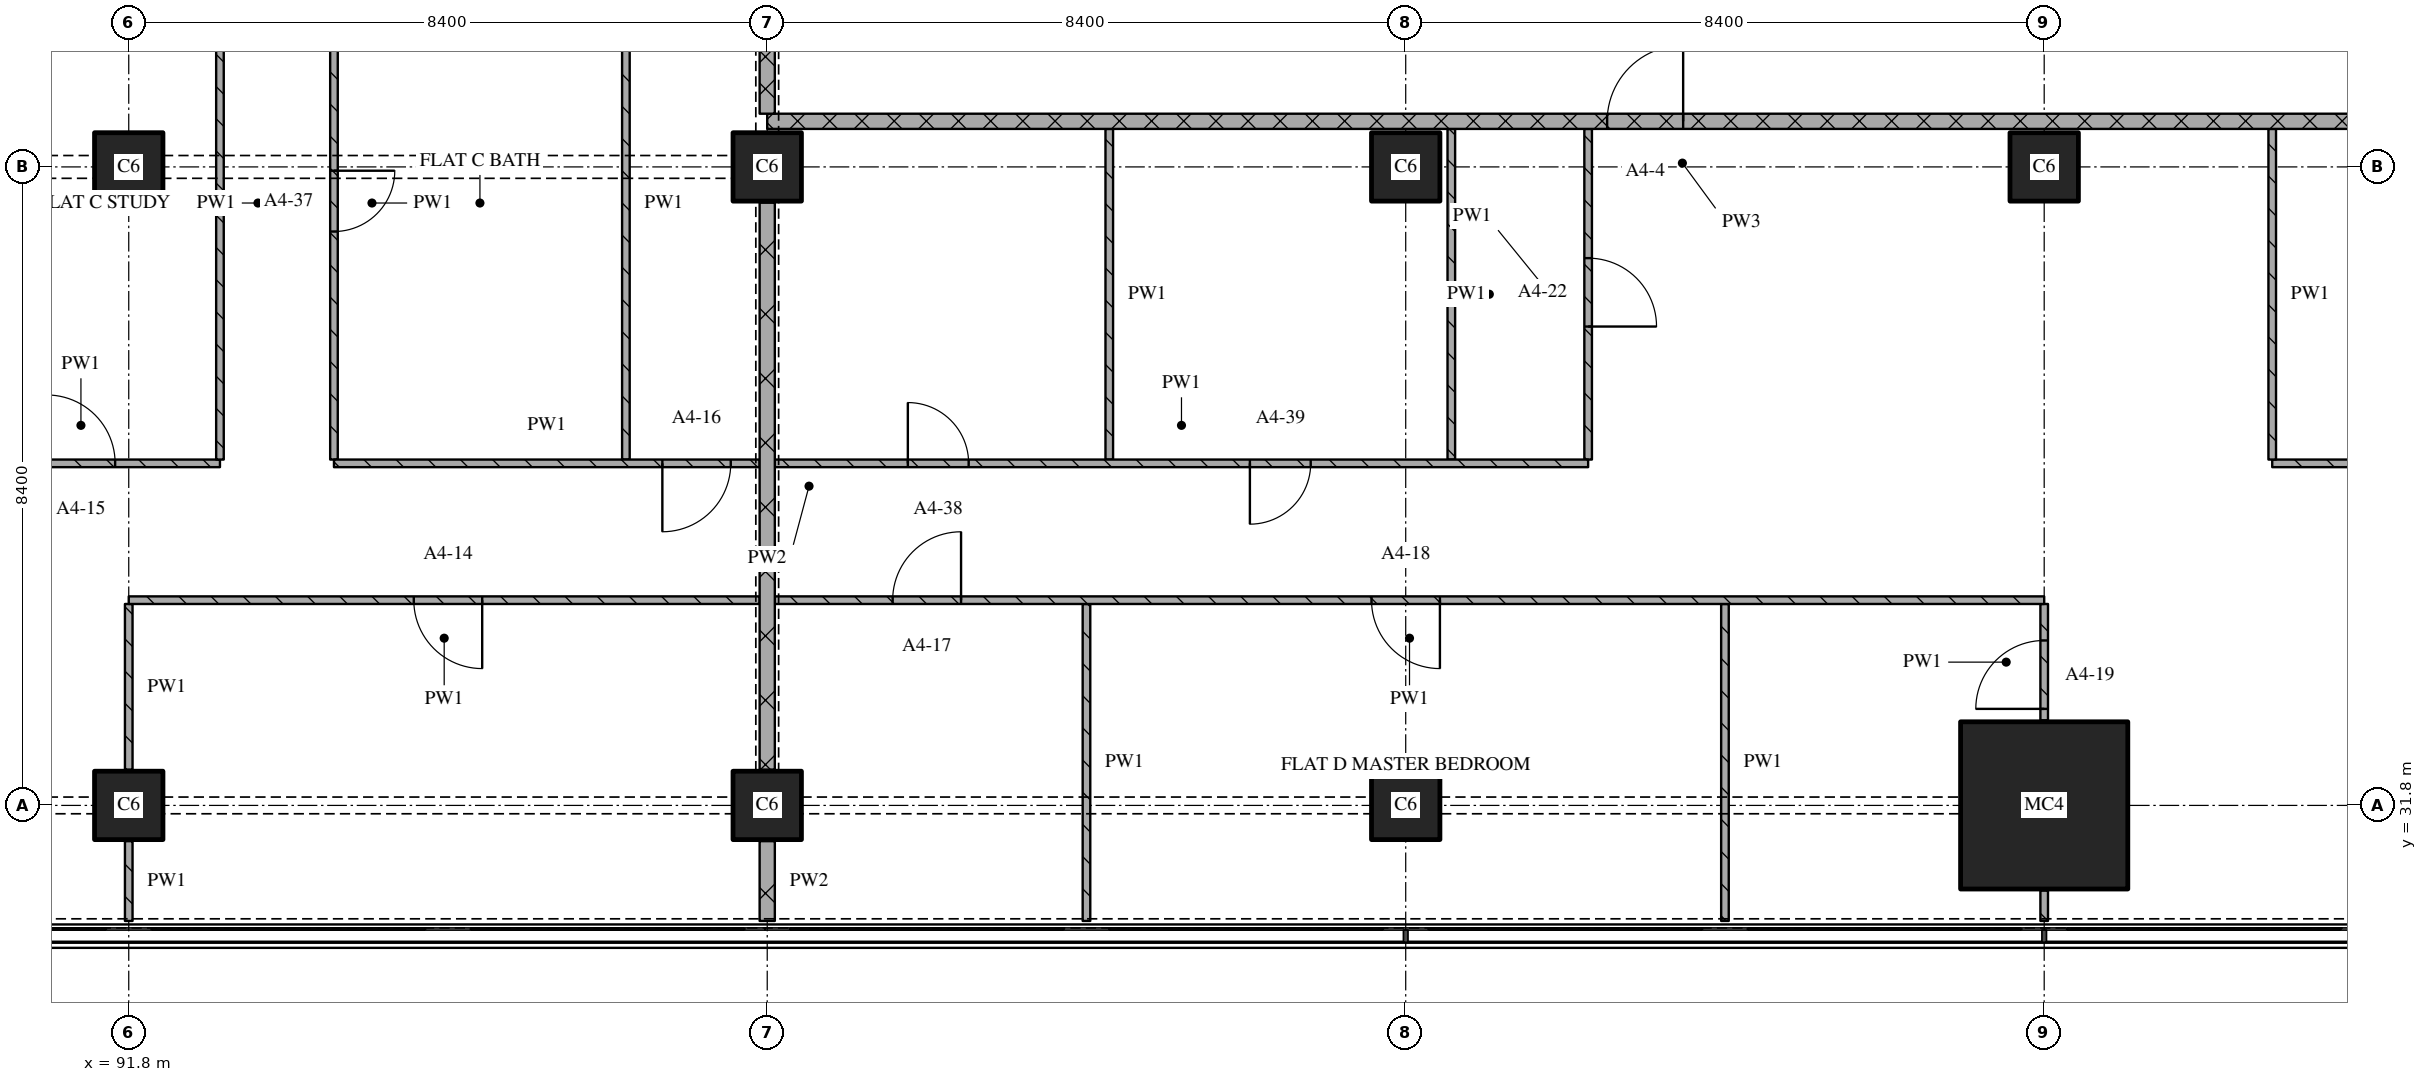
"""IFC4 building model, lengths in metres.
Left out: names, types, materials, properties, quantities, classifications, styles, units other than length and angle.
Written with IfcOpenShell. Run it as: python <this file> out.ifc"""

import sys

from ifc_helpers import new_model, si_unit, direction, frame, frame_2d, origin, origin_2d, place, context, subcontext, project, spatial, rectangle, extrude, element, fill, save


model = new_model("IFC4")
c1 = context("Model", 3, precision=1e-05, world=origin(), true_north=direction((0.0, 1.0)))
c2 = subcontext(c1, "Body", "Model", "MODEL_VIEW")
j1 = project(units=[si_unit("LENGTHUNIT", "METRE"), si_unit("PLANEANGLEUNIT", "RADIAN")], contexts=[c1])
p1 = place(None, origin())
s1 = spatial("IfcSite", under=j1, at=p1, CompositionType="ELEMENT")
p2 = place(p1, origin())
s2 = spatial("IfcBuilding", under=s1, at=p2, CompositionType="ELEMENT")
p3 = place(p2, frame((0.0, 0.0, 69.6)))
s3 = spatial("IfcBuildingStorey", under=s2, at=p3, CompositionType="ELEMENT", Elevation=69.6)
for number, where, z_axis, x_axis in (
    (1, (91.8, 31.8, 0.0), (0.0, 0.0, 1.0), (1.0, 0.0, 0.0)),
    (2, (91.8, 40.2, 0.0), (0.0, 0.0, 1.0), (1.0, 0.0, 0.0)),
    (3, (100.2, 31.8, 0.0), (0.0, 0.0, 1.0), (1.0, 0.0, 0.0)),
    (4, (100.2, 40.2, 0.0), (0.0, 0.0, 1.0), (1.0, 0.0, 0.0)),
    (5, (108.6, 31.8, 0.0), (0.0, 0.0, 1.0), (1.0, 0.0, 0.0)),
    (6, (108.6, 40.2, 0.0), (0.0, 0.0, 1.0), (1.0, 0.0, 0.0)),
):
    element("IfcColumn", number, at=place(p3, frame(where, z_axis=z_axis, x_axis=x_axis)), inside=s3, PredefinedType="COLUMN", context=c2, shape_type="SweptSolid", body=[
        extrude(rectangle(XDim=0.9, YDim=0.9, at=origin_2d()), origin(), (0.0, 0.0, 1.0), 3.6),
    ])
p4 = place(p3, frame((117.0, 31.8, 0.0), z_axis=(0.0, 0.0, 1.0), x_axis=(1.0, 0.0, 0.0)))
e7 = element("IfcColumn", 7, at=p4, inside=s3, PredefinedType="COLUMN", context=c2, shape_type="SweptSolid", body=[
    extrude(rectangle(XDim=2.2, YDim=2.2, at=origin_2d()), origin(), (0.0, 0.0, 1.0), 3.6),
])
p5 = place(p3, frame((117.0, 40.2, 0.0), z_axis=(0.0, 0.0, 1.0), x_axis=(1.0, 0.0, 0.0)))
e8 = element("IfcColumn", 8, at=p5, inside=s3, PredefinedType="COLUMN", context=c2, shape_type="SweptSolid", body=[
    extrude(rectangle(XDim=0.9, YDim=0.9, at=origin_2d()), origin(), (0.0, 0.0, 1.0), 3.6),
])
p6 = place(p3, frame((89.342, 36.3, 0.0), z_axis=(0.0, 0.0, 1.0), x_axis=(1.0, 0.0, 0.0)))
e9 = element("IfcWall", 9, at=p6, inside=s3, PredefinedType="PARTITIONING", context=c2, shape_type="SweptSolid", body=[
    extrude(rectangle(XDim=3.658, YDim=0.1, at=frame_2d((1.829, 0.0))), origin(), (0.0, 0.0, 1.0), 3.32),
])
p7 = place(p6, frame((1.379, 0.0, 0.0)))
e10 = element("IfcOpeningElement", 10, at=p7, cuts=e9, PredefinedType="OPENING", context=c2, shape_type="SweptSolid", body=[
    extrude(rectangle(XDim=0.9, YDim=2.1, at=frame_2d((0.45, 1.05))), frame((0.0, 0.06, 0.0), z_axis=(0.0, -1.0, 0.0), x_axis=(1.0, 0.0, 0.0)), (0.0, 0.0, 1.0), 0.12),
])
p8 = place(p3, frame((120.0, 36.3, 0.0), z_axis=(0.0, 0.0, 1.0), x_axis=(1.0, 0.0, 0.0)))
e11 = element("IfcWall", 11, at=p8, inside=s3, PredefinedType="PARTITIONING", context=c2, shape_type="SweptSolid", body=[
    extrude(rectangle(XDim=6.92, YDim=0.1, at=frame_2d((3.46, 0.0))), origin(), (0.0, 0.0, 1.0), 3.32),
])
p9 = place(p8, frame((3.15, 0.0, 0.0)))
e12 = element("IfcOpeningElement", 12, at=p9, cuts=e11, PredefinedType="OPENING", context=c2, shape_type="SweptSolid", body=[
    extrude(rectangle(XDim=0.9, YDim=2.1, at=frame_2d((0.45, 1.05))), frame((0.0, 0.06, 0.0), z_axis=(0.0, -1.0, 0.0), x_axis=(1.0, 0.0, 0.0)), (0.0, 0.0, 1.0), 0.12),
])
p10 = place(p3, frame((124.28, 40.8, 0.0), z_axis=(0.0, 0.0, 1.0), x_axis=(-1.0, 0.0, 0.0)))
e13 = element("IfcWall", 13, at=p10, inside=s3, PredefinedType="PARTITIONING", context=c2, shape_type="SweptSolid", body=[
    extrude(rectangle(XDim=24.08, YDim=0.2, at=frame_2d((12.04, 0.0))), origin(), (0.0, 0.0, 1.0), 3.32),
])
p11 = place(p10, frame((12.03, 0.0, 0.0)))
e14 = element("IfcOpeningElement", 14, at=p11, cuts=e13, PredefinedType="OPENING", context=c2, shape_type="SweptSolid", body=[
    extrude(rectangle(XDim=1.0, YDim=2.1, at=frame_2d((0.5, 1.05))), frame((0.0, 0.11, 0.0), z_axis=(0.0, -1.0, 0.0), x_axis=(1.0, 0.0, 0.0)), (0.0, 0.0, 1.0), 0.22),
])
p12 = place(p3, frame((91.8, 31.33, 0.0), z_axis=(0.0, 0.0, 1.0), x_axis=(0.0, -1.0, 0.0)))
e15 = element("IfcWall", 15, at=p12, inside=s3, PredefinedType="PARTITIONING", context=c2, shape_type="SweptSolid", body=[
    extrude(rectangle(XDim=1.05, YDim=0.1, at=frame_2d((0.525, 0.0))), origin(), (0.0, 0.0, 1.0), 3.32),
])
p13 = place(p3, frame((91.8, 34.45, 0.0), z_axis=(0.0, 0.0, 1.0), x_axis=(0.0, -1.0, 0.0)))
e16 = element("IfcWall", 16, at=p13, inside=s3, PredefinedType="PARTITIONING", context=c2, shape_type="SweptSolid", body=[
    extrude(rectangle(XDim=2.18, YDim=0.1, at=frame_2d((1.09, 0.0))), origin(), (0.0, 0.0, 1.0), 3.32),
])
p14 = place(p3, frame((93.0, 43.1, 0.0), z_axis=(0.0, 0.0, 1.0), x_axis=(0.0, -1.0, 0.0)))
e17 = element("IfcWall", 17, at=p14, inside=s3, PredefinedType="PARTITIONING", context=c2, shape_type="SweptSolid", body=[
    extrude(rectangle(XDim=6.75, YDim=0.1, at=frame_2d((3.375, 0.0))), origin(), (0.0, 0.0, 1.0), 3.32),
])
p15 = place(p3, frame((94.5, 43.1, 0.0), z_axis=(0.0, 0.0, 1.0), x_axis=(0.0, -1.0, 0.0)))
e18 = element("IfcWall", 18, at=p15, inside=s3, PredefinedType="PARTITIONING", context=c2, shape_type="SweptSolid", body=[
    extrude(rectangle(XDim=6.75, YDim=0.1, at=frame_2d((3.375, 0.0))), origin(), (0.0, 0.0, 1.0), 3.32),
])
p16 = place(p15, frame((2.95, 0.0, 0.0)))
e19 = element("IfcOpeningElement", 19, at=p16, cuts=e18, PredefinedType="OPENING", context=c2, shape_type="SweptSolid", body=[
    extrude(rectangle(XDim=0.8, YDim=2.1, at=frame_2d((0.4, 1.05))), frame((0.0, 0.06, 0.0), z_axis=(0.0, -1.0, 0.0), x_axis=(1.0, 0.0, 0.0)), (0.0, 0.0, 1.0), 0.12),
])
p17 = place(p3, frame((98.341, 43.1, 0.0), z_axis=(0.0, 0.0, 1.0), x_axis=(0.0, -1.0, 0.0)))
e20 = element("IfcWall", 20, at=p17, inside=s3, PredefinedType="PARTITIONING", context=c2, shape_type="SweptSolid", body=[
    extrude(rectangle(XDim=6.75, YDim=0.1, at=frame_2d((3.375, 0.0))), origin(), (0.0, 0.0, 1.0), 3.32),
])
p18 = place(p3, frame((100.2, 43.1, 0.0), z_axis=(0.0, 0.0, 1.0), x_axis=(0.0, -1.0, 0.0)))
e21 = element("IfcWall", 21, at=p18, inside=s3, PredefinedType="PARTITIONING", context=c2, shape_type="SweptSolid", body=[
    extrude(rectangle(XDim=2.2, YDim=0.2, at=frame_2d((1.1, 0.0))), origin(), (0.0, 0.0, 1.0), 2.43),
])
p19 = place(p3, frame((100.2, 31.33, 0.0), z_axis=(0.0, 0.0, 1.0), x_axis=(0.0, -1.0, 0.0)))
e22 = element("IfcWall", 22, at=p19, inside=s3, PredefinedType="PARTITIONING", context=c2, shape_type="SweptSolid", body=[
    extrude(rectangle(XDim=1.05, YDim=0.2, at=frame_2d((0.525, 0.0))), origin(), (0.0, 0.0, 1.0), 3.32),
])
p20 = place(p3, frame((100.2, 39.73, 0.0), z_axis=(0.0, 0.0, 1.0), x_axis=(0.0, -1.0, 0.0)))
e23 = element("IfcWall", 23, at=p20, inside=s3, PredefinedType="PARTITIONING", context=c2, shape_type="SweptSolid", body=[
    extrude(rectangle(XDim=7.46, YDim=0.2, at=frame_2d((3.73, 0.0))), origin(), (0.0, 0.0, 1.0), 2.83),
])
p21 = place(p3, frame((104.4, 34.45, 0.0), z_axis=(0.0, 0.0, 1.0), x_axis=(0.0, -1.0, 0.0)))
e24 = element("IfcWall", 24, at=p21, inside=s3, PredefinedType="PARTITIONING", context=c2, shape_type="SweptSolid", body=[
    extrude(rectangle(XDim=4.17, YDim=0.1, at=frame_2d((2.085, 0.0))), origin(), (0.0, 0.0, 1.0), 3.32),
])
for number, where, z_axis, x_axis in (
    (25, (104.7, 40.7, 0.0), (0.0, 0.0, 1.0), (0.0, -1.0, 0.0)),
    (26, (109.2, 40.7, 0.0), (0.0, 0.0, 1.0), (0.0, -1.0, 0.0)),
):
    element("IfcWall", number, at=place(p3, frame(where, z_axis=z_axis, x_axis=x_axis)), inside=s3, PredefinedType="PARTITIONING", context=c2, shape_type="SweptSolid", body=[
        extrude(rectangle(XDim=4.35, YDim=0.1, at=frame_2d((2.175, 0.0))), origin(), (0.0, 0.0, 1.0), 3.32),
    ])
p22 = place(p3, frame((111.0, 36.35, 0.0), z_axis=(0.0, 0.0, 1.0), x_axis=(0.0, 1.0, 0.0)))
e27 = element("IfcWall", 27, at=p22, inside=s3, PredefinedType="PARTITIONING", context=c2, shape_type="SweptSolid", body=[
    extrude(rectangle(XDim=4.35, YDim=0.1, at=frame_2d((2.175, 0.0))), origin(), (0.0, 0.0, 1.0), 3.32),
])
p23 = place(p22, frame((1.75, 0.0, 0.0)))
e28 = element("IfcOpeningElement", 28, at=p23, cuts=e27, PredefinedType="OPENING", context=c2, shape_type="SweptSolid", body=[
    extrude(rectangle(XDim=0.9, YDim=2.1, at=frame_2d((0.45, 1.05))), frame((0.0, 0.06, 0.0), z_axis=(0.0, -1.0, 0.0), x_axis=(1.0, 0.0, 0.0)), (0.0, 0.0, 1.0), 0.12),
])
p24 = place(p3, frame((112.8, 34.45, 0.0), z_axis=(0.0, 0.0, 1.0), x_axis=(0.0, -1.0, 0.0)))
e29 = element("IfcWall", 29, at=p24, inside=s3, PredefinedType="PARTITIONING", context=c2, shape_type="SweptSolid", body=[
    extrude(rectangle(XDim=4.17, YDim=0.1, at=frame_2d((2.085, 0.0))), origin(), (0.0, 0.0, 1.0), 3.32),
])
p25 = place(p3, frame((117.0, 30.68, 0.0), z_axis=(0.0, 0.0, 1.0), x_axis=(0.0, -1.0, 0.0)))
e30 = element("IfcWall", 30, at=p25, inside=s3, PredefinedType="PARTITIONING", context=c2, shape_type="SweptSolid", body=[
    extrude(rectangle(XDim=0.4, YDim=0.1, at=frame_2d((0.2, 0.0))), origin(), (0.0, 0.0, 1.0), 3.32),
])
p26 = place(p3, frame((117.0, 32.92, 0.0), z_axis=(0.0, 0.0, 1.0), x_axis=(0.0, 1.0, 0.0)))
e31 = element("IfcWall", 31, at=p26, inside=s3, PredefinedType="PARTITIONING", context=c2, shape_type="SweptSolid", body=[
    extrude(rectangle(XDim=1.53, YDim=0.1, at=frame_2d((0.765, 0.0))), origin(), (0.0, 0.0, 1.0), 3.32),
])
p27 = place(p26, frame((0.15, 0.0, 0.0)))
e32 = element("IfcOpeningElement", 32, at=p27, cuts=e31, PredefinedType="OPENING", context=c2, shape_type="SweptSolid", body=[
    extrude(rectangle(XDim=0.9, YDim=2.1, at=frame_2d((0.45, 1.05))), frame((0.0, 0.06, 0.0), z_axis=(0.0, -1.0, 0.0), x_axis=(1.0, 0.0, 0.0)), (0.0, 0.0, 1.0), 0.12),
])
p28 = place(p3, frame((120.0, 40.7, 0.0), z_axis=(0.0, 0.0, 1.0), x_axis=(0.0, -1.0, 0.0)))
e33 = element("IfcWall", 33, at=p28, inside=s3, PredefinedType="PARTITIONING", context=c2, shape_type="SweptSolid", body=[
    extrude(rectangle(XDim=4.35, YDim=0.1, at=frame_2d((2.175, 0.0))), origin(), (0.0, 0.0, 1.0), 3.32),
])
p29 = place(p3, frame((100.1, 34.5, 0.0), z_axis=(0.0, 0.0, 1.0), x_axis=(-1.0, 0.0, 0.0)))
e34 = element("IfcWall", 34, at=p29, inside=s3, PredefinedType="PARTITIONING", context=c2, shape_type="SweptSolid", body=[
    extrude(rectangle(XDim=8.3, YDim=0.1, at=frame_2d((4.15, 0.0))), origin(), (0.0, 0.0, 1.0), 3.32),
])
p30 = place(p29, frame((3.65, 0.0, 0.0)))
e35 = element("IfcOpeningElement", 35, at=p30, cuts=e34, PredefinedType="OPENING", context=c2, shape_type="SweptSolid", body=[
    extrude(rectangle(XDim=0.9, YDim=2.1, at=frame_2d((0.45, 1.05))), frame((0.0, 0.06, 0.0), z_axis=(0.0, -1.0, 0.0), x_axis=(1.0, 0.0, 0.0)), (0.0, 0.0, 1.0), 0.12),
])
p31 = place(p3, frame((117.0, 34.5, 0.0), z_axis=(0.0, 0.0, 1.0), x_axis=(-1.0, 0.0, 0.0)))
e36 = element("IfcWall", 36, at=p31, inside=s3, PredefinedType="PARTITIONING", context=c2, shape_type="SweptSolid", body=[
    extrude(rectangle(XDim=16.7, YDim=0.1, at=frame_2d((8.35, 0.0))), origin(), (0.0, 0.0, 1.0), 3.32),
])
p32 = place(p31, frame((7.95, 0.0, 0.0)))
e37 = element("IfcOpeningElement", 37, at=p32, cuts=e36, PredefinedType="OPENING", context=c2, shape_type="SweptSolid", body=[
    extrude(rectangle(XDim=0.9, YDim=2.1, at=frame_2d((0.45, 1.05))), frame((0.0, 0.06, 0.0), z_axis=(0.0, -1.0, 0.0), x_axis=(1.0, 0.0, 0.0)), (0.0, 0.0, 1.0), 0.12),
])
p33 = place(p31, frame((14.25, 0.0, 0.0)))
e38 = element("IfcOpeningElement", 38, at=p33, cuts=e36, PredefinedType="OPENING", context=c2, shape_type="SweptSolid", body=[
    extrude(rectangle(XDim=0.9, YDim=2.1, at=frame_2d((0.45, 1.05))), frame((0.0, 0.06, 0.0), z_axis=(0.0, -1.0, 0.0), x_axis=(1.0, 0.0, 0.0)), (0.0, 0.0, 1.0), 0.12),
])
p34 = place(p3, frame((94.5, 36.3, 0.0), z_axis=(0.0, 0.0, 1.0), x_axis=(1.0, 0.0, 0.0)))
e39 = element("IfcWall", 39, at=p34, inside=s3, PredefinedType="PARTITIONING", context=c2, shape_type="SweptSolid", body=[
    extrude(rectangle(XDim=5.6, YDim=0.1, at=frame_2d((2.8, 0.0))), origin(), (0.0, 0.0, 1.0), 3.32),
])
p35 = place(p34, frame((4.32, 0.0, 0.0)))
e40 = element("IfcOpeningElement", 40, at=p35, cuts=e39, PredefinedType="OPENING", context=c2, shape_type="SweptSolid", body=[
    extrude(rectangle(XDim=0.9, YDim=2.1, at=frame_2d((0.45, 1.05))), frame((0.0, 0.06, 0.0), z_axis=(0.0, -1.0, 0.0), x_axis=(1.0, 0.0, 0.0)), (0.0, 0.0, 1.0), 0.12),
])
p36 = place(p3, frame((100.3, 36.3, 0.0), z_axis=(0.0, 0.0, 1.0), x_axis=(1.0, 0.0, 0.0)))
e41 = element("IfcWall", 41, at=p36, inside=s3, PredefinedType="PARTITIONING", context=c2, shape_type="SweptSolid", body=[
    extrude(rectangle(XDim=10.7, YDim=0.1, at=frame_2d((5.35, 0.0))), origin(), (0.0, 0.0, 1.0), 3.32),
])
p37 = place(p36, frame((1.75, 0.0, 0.0)))
e42 = element("IfcOpeningElement", 42, at=p37, cuts=e41, PredefinedType="OPENING", context=c2, shape_type="SweptSolid", body=[
    extrude(rectangle(XDim=0.8, YDim=2.1, at=frame_2d((0.4, 1.05))), frame((0.0, 0.06, 0.0), z_axis=(0.0, -1.0, 0.0), x_axis=(1.0, 0.0, 0.0)), (0.0, 0.0, 1.0), 0.12),
])
p38 = place(p36, frame((6.25, 0.0, 0.0)))
e43 = element("IfcOpeningElement", 43, at=p38, cuts=e41, PredefinedType="OPENING", context=c2, shape_type="SweptSolid", body=[
    extrude(rectangle(XDim=0.8, YDim=2.1, at=frame_2d((0.4, 1.05))), frame((0.0, 0.06, 0.0), z_axis=(0.0, -1.0, 0.0), x_axis=(1.0, 0.0, 0.0)), (0.0, 0.0, 1.0), 0.12),
])
p39 = place(p7, origin())
e44 = element("IfcDoor", 44, at=p39, inside=s3, OperationType="SINGLE_SWING_LEFT", PredefinedType="DOOR", context=c2, shape_type="SweptSolid", body=[
    extrude(rectangle(XDim=0.9, YDim=2.1, at=frame_2d((0.45, 1.05))), frame((0.0, 0.025, 0.0), z_axis=(0.0, -1.0, 0.0), x_axis=(1.0, 0.0, 0.0)), (0.0, 0.0, 1.0), 0.05),
])
fill(e10, e44)
p40 = place(p11, origin())
e45 = element("IfcDoor", 45, at=p40, inside=s3, OperationType="SINGLE_SWING_RIGHT", PredefinedType="DOOR", context=c2, shape_type="SweptSolid", body=[
    extrude(rectangle(XDim=1.0, YDim=2.1, at=frame_2d((0.5, 1.05))), frame((0.0, 0.025, 0.0), z_axis=(0.0, -1.0, 0.0), x_axis=(1.0, 0.0, 0.0)), (0.0, 0.0, 1.0), 0.05),
])
fill(e14, e45)
p41 = place(p16, origin())
e46 = element("IfcDoor", 46, at=p41, inside=s3, OperationType="SINGLE_SWING_LEFT", PredefinedType="DOOR", context=c2, shape_type="SweptSolid", body=[
    extrude(rectangle(XDim=0.8, YDim=2.1, at=frame_2d((0.4, 1.05))), frame((0.0, 0.025, 0.0), z_axis=(0.0, -1.0, 0.0), x_axis=(1.0, 0.0, 0.0)), (0.0, 0.0, 1.0), 0.05),
])
fill(e19, e46)
p42 = place(p23, origin())
e47 = element("IfcDoor", 47, at=p42, inside=s3, OperationType="SINGLE_SWING_RIGHT", PredefinedType="DOOR", context=c2, shape_type="SweptSolid", body=[
    extrude(rectangle(XDim=0.9, YDim=2.1, at=frame_2d((0.45, 1.05))), frame((0.0, 0.025, 0.0), z_axis=(0.0, -1.0, 0.0), x_axis=(1.0, 0.0, 0.0)), (0.0, 0.0, 1.0), 0.05),
])
fill(e28, e47)
p43 = place(p27, origin())
e48 = element("IfcDoor", 48, at=p43, inside=s3, OperationType="SINGLE_SWING_LEFT", PredefinedType="DOOR", context=c2, shape_type="SweptSolid", body=[
    extrude(rectangle(XDim=0.9, YDim=2.1, at=frame_2d((0.45, 1.05))), frame((0.0, 0.025, 0.0), z_axis=(0.0, -1.0, 0.0), x_axis=(1.0, 0.0, 0.0)), (0.0, 0.0, 1.0), 0.05),
])
fill(e32, e48)
p44 = place(p30, origin())
e49 = element("IfcDoor", 49, at=p44, inside=s3, OperationType="SINGLE_SWING_LEFT", PredefinedType="DOOR", context=c2, shape_type="SweptSolid", body=[
    extrude(rectangle(XDim=0.9, YDim=2.1, at=frame_2d((0.45, 1.05))), frame((0.0, 0.025, 0.0), z_axis=(0.0, -1.0, 0.0), x_axis=(1.0, 0.0, 0.0)), (0.0, 0.0, 1.0), 0.05),
])
fill(e35, e49)
p45 = place(p32, origin())
e50 = element("IfcDoor", 50, at=p45, inside=s3, OperationType="SINGLE_SWING_LEFT", PredefinedType="DOOR", context=c2, shape_type="SweptSolid", body=[
    extrude(rectangle(XDim=0.9, YDim=2.1, at=frame_2d((0.45, 1.05))), frame((0.0, 0.025, 0.0), z_axis=(0.0, -1.0, 0.0), x_axis=(1.0, 0.0, 0.0)), (0.0, 0.0, 1.0), 0.05),
])
fill(e37, e50)
p46 = place(p33, origin())
e51 = element("IfcDoor", 51, at=p46, inside=s3, OperationType="SINGLE_SWING_RIGHT", PredefinedType="DOOR", context=c2, shape_type="SweptSolid", body=[
    extrude(rectangle(XDim=0.9, YDim=2.1, at=frame_2d((0.45, 1.05))), frame((0.0, 0.025, 0.0), z_axis=(0.0, -1.0, 0.0), x_axis=(1.0, 0.0, 0.0)), (0.0, 0.0, 1.0), 0.05),
])
fill(e38, e51)
p47 = place(p35, origin())
e52 = element("IfcDoor", 52, at=p47, inside=s3, OperationType="SINGLE_SWING_RIGHT", PredefinedType="DOOR", context=c2, shape_type="SweptSolid", body=[
    extrude(rectangle(XDim=0.9, YDim=2.1, at=frame_2d((0.45, 1.05))), frame((0.0, 0.025, 0.0), z_axis=(0.0, -1.0, 0.0), x_axis=(1.0, 0.0, 0.0)), (0.0, 0.0, 1.0), 0.05),
])
fill(e40, e52)
p48 = place(p37, origin())
e53 = element("IfcDoor", 53, at=p48, inside=s3, OperationType="SINGLE_SWING_LEFT", PredefinedType="DOOR", context=c2, shape_type="SweptSolid", body=[
    extrude(rectangle(XDim=0.8, YDim=2.1, at=frame_2d((0.4, 1.05))), frame((0.0, 0.025, 0.0), z_axis=(0.0, -1.0, 0.0), x_axis=(1.0, 0.0, 0.0)), (0.0, 0.0, 1.0), 0.05),
])
fill(e42, e53)
p49 = place(p38, origin())
e54 = element("IfcDoor", 54, at=p49, inside=s3, OperationType="SINGLE_SWING_RIGHT", PredefinedType="DOOR", context=c2, shape_type="SweptSolid", body=[
    extrude(rectangle(XDim=0.8, YDim=2.1, at=frame_2d((0.4, 1.05))), frame((0.0, 0.025, 0.0), z_axis=(0.0, -1.0, 0.0), x_axis=(1.0, 0.0, 0.0)), (0.0, 0.0, 1.0), 0.05),
])
fill(e43, e54)
save(model, sys.argv[1])
